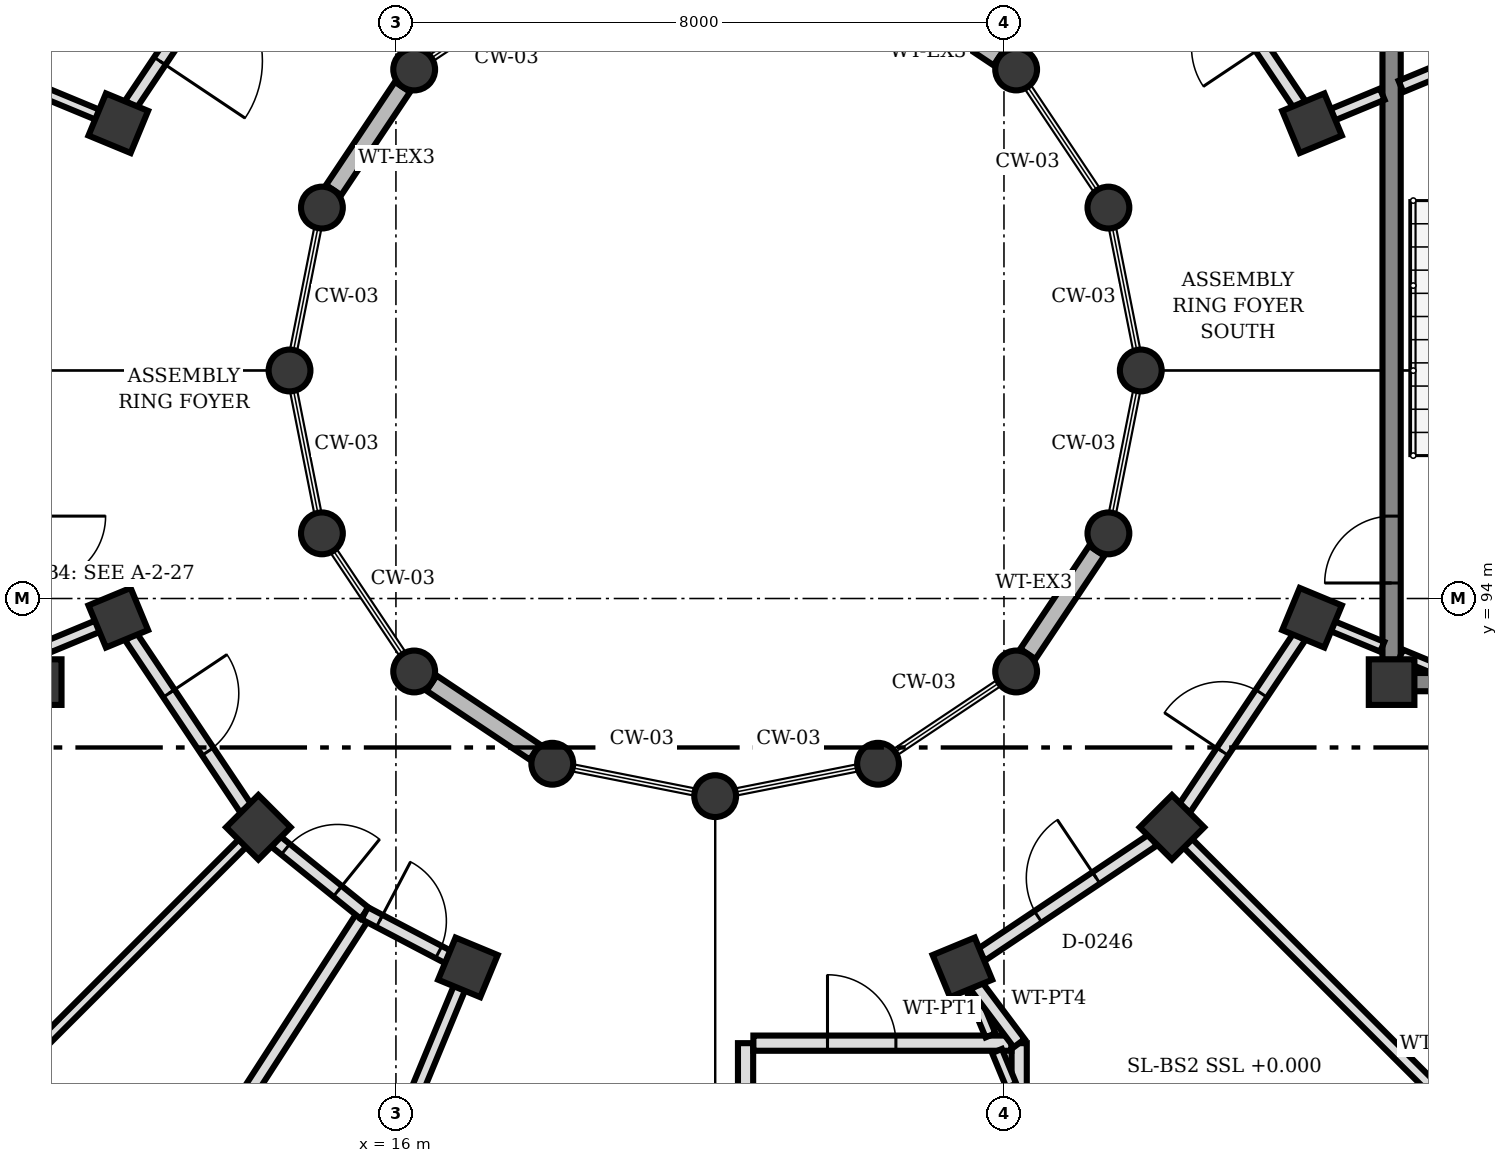
"""IFC4 building model, lengths in metres.
Left out: names, types, materials, properties, quantities, classifications, styles, units other than length and angle.
Written with IfcOpenShell. Run it as: python <this file> out.ifc"""

import sys

from ifc_helpers import new_model, si_unit, direction, frame, frame_2d, origin, origin_2d, place, context, subcontext, project, spatial, rectangle, circle, extrude, element, fill, save


model = new_model("IFC4")
c1 = context("Model", 3, precision=1e-05, world=origin(), true_north=direction((0.0, 1.0)))
c2 = subcontext(c1, "Body", "Model", "MODEL_VIEW")
j1 = project(units=[si_unit("LENGTHUNIT", "METRE"), si_unit("PLANEANGLEUNIT", "RADIAN")], contexts=[c1])
p1 = place(None, origin())
s1 = spatial("IfcSite", under=j1, at=p1, CompositionType="ELEMENT")
p2 = place(p1, origin())
s2 = spatial("IfcBuilding", under=s1, at=p2, CompositionType="ELEMENT")
p3 = place(p2, origin())
s3 = spatial("IfcBuildingStorey", under=s2, at=p3, CompositionType="ELEMENT", Elevation=0.0)
for number, where, z_axis, x_axis in (
    (1, (11.3, 92.9, 0.0), (0.0, 0.0, 1.0), (1.0, 0.0, 0.0)),
    (2, (29.1, 92.9, 0.0), (0.0, 0.0, 1.0), (1.0, 0.0, 0.0)),
):
    element("IfcColumn", number, at=place(p3, frame(where, z_axis=z_axis, x_axis=x_axis)), inside=s3, PredefinedType="COLUMN", context=c2, shape_type="SweptSolid", body=[
        extrude(rectangle(XDim=0.6, YDim=0.6, at=origin_2d()), origin(), (0.0, 0.0, 1.0), 4.5),
    ])
for number, where, z_axis, x_axis in (
    (3, (25.8, 97.0, 0.0), (0.0, 0.0, 1.0), (1.0, 0.0, 0.0)),
    (4, (25.374, 99.143, 0.0), (0.0, 0.0, 1.0), (1.0, 0.0, 0.0)),
    (5, (24.16, 100.96, 0.0), (0.0, 0.0, 1.0), (1.0, 0.0, 0.0)),
    (6, (16.24, 100.96, 0.0), (0.0, 0.0, 1.0), (1.0, 0.0, 0.0)),
    (7, (15.026, 99.143, 0.0), (0.0, 0.0, 1.0), (1.0, 0.0, 0.0)),
    (8, (14.6, 97.0, 0.0), (0.0, 0.0, 1.0), (1.0, 0.0, 0.0)),
    (9, (15.026, 94.857, 0.0), (0.0, 0.0, 1.0), (1.0, 0.0, 0.0)),
    (10, (16.24, 93.04, 0.0), (0.0, 0.0, 1.0), (1.0, 0.0, 0.0)),
    (11, (18.057, 91.826, 0.0), (0.0, 0.0, 1.0), (1.0, 0.0, 0.0)),
    (12, (20.2, 91.4, 0.0), (0.0, 0.0, 1.0), (1.0, 0.0, 0.0)),
    (13, (22.343, 91.826, 0.0), (0.0, 0.0, 1.0), (1.0, 0.0, 0.0)),
    (14, (24.16, 93.04, 0.0), (0.0, 0.0, 1.0), (1.0, 0.0, 0.0)),
    (15, (25.374, 94.857, 0.0), (0.0, 0.0, 1.0), (1.0, 0.0, 0.0)),
):
    element("IfcColumn", number, at=place(p3, frame(where, z_axis=z_axis, x_axis=x_axis)), inside=s3, PredefinedType="COLUMN", context=c2, shape_type="SweptSolid", body=[
        extrude(circle(Radius=0.275, at=origin_2d()), origin(), (0.0, 0.0, 1.0), 4.5),
    ])
for number, where, z_axis, x_axis in (
    (16, (28.053, 100.253, 0.0), (0.0, 0.0, 1.0), (0.924, 0.383, 0.0)),
    (17, (12.347, 100.253, 0.0), (0.0, 0.0, 1.0), (-0.924, 0.383, 0.0)),
    (18, (12.347, 93.747, 0.0), (0.0, 0.0, 1.0), (-0.924, -0.383, 0.0)),
    (19, (14.19, 90.99, 0.0), (0.0, 0.0, 1.0), (-0.707, -0.707, 0.0)),
    (20, (16.947, 89.147, 0.0), (0.0, 0.0, 1.0), (-0.383, -0.924, 0.0)),
    (21, (23.453, 89.147, 0.0), (0.0, 0.0, 1.0), (0.383, -0.924, 0.0)),
    (22, (26.21, 90.99, 0.0), (0.0, 0.0, 1.0), (0.707, -0.707, 0.0)),
    (23, (28.053, 93.747, 0.0), (0.0, 0.0, 1.0), (0.924, -0.383, 0.0)),
):
    element("IfcColumn", number, at=place(p3, frame(where, z_axis=z_axis, x_axis=x_axis)), inside=s3, PredefinedType="COLUMN", context=c2, shape_type="SweptSolid", body=[
        extrude(rectangle(XDim=0.6, YDim=0.6, at=origin_2d()), origin(), (0.0, 0.0, 1.0), 4.5),
    ])
for number, where, z_axis, x_axis in (
    (24, (23.93, 101.114, 0.0), (0.0, 0.0, 1.0), (-0.832, 0.555, 0.0)),
    (25, (16.086, 100.73, 0.0), (0.0, 0.0, 1.0), (-0.555, -0.832, 0.0)),
    (26, (16.47, 92.886, 0.0), (0.0, 0.0, 1.0), (0.832, -0.555, 0.0)),
    (27, (24.314, 93.27, 0.0), (0.0, 0.0, 1.0), (0.555, 0.832, 0.0)),
):
    element("IfcWall", number, at=place(p3, frame(where, z_axis=z_axis, x_axis=x_axis)), inside=s3, PredefinedType="SOLIDWALL", context=c2, shape_type="SweptSolid", body=[
        extrude(rectangle(XDim=1.632, YDim=0.24, at=frame_2d((0.816, 0.0))), origin(), (0.0, 0.0, 1.0), 3.55),
    ])
p4 = place(p3, frame((29.1, 93.192, 0.0), z_axis=(0.0, 0.0, 1.0), x_axis=(0.0, 1.0, 0.0)))
e28 = element("IfcWall", 28, at=p4, inside=s3, PredefinedType="SHEAR", context=c2, shape_type="SweptSolid", body=[
    extrude(rectangle(XDim=8.136, YDim=0.24, at=frame_2d((4.068, 0.0))), origin(), (0.0, 0.0, 1.0), 4.24),
])
p5 = place(p4, frame((1.012, 0.0, 0.0)))
e29 = element("IfcOpeningElement", 29, at=p5, cuts=e28, PredefinedType="OPENING", context=c2, shape_type="SweptSolid", body=[
    extrude(rectangle(XDim=0.88, YDim=2.1, at=frame_2d((0.44, 1.05))), frame((0.0, 0.13, 0.0), z_axis=(0.0, -1.0, 0.0), x_axis=(1.0, 0.0, 0.0)), (0.0, 0.0, 1.0), 0.26),
])
p6 = place(p3, frame((33.608, 92.9, 0.0), z_axis=(0.0, 0.0, 1.0), x_axis=(-1.0, 0.0, 0.0)))
e30 = element("IfcWall", 30, at=p6, inside=s3, PredefinedType="SHEAR", context=c2, shape_type="SweptSolid", body=[
    extrude(rectangle(XDim=4.216, YDim=0.24, at=frame_2d((2.108, 0.0))), origin(), (0.0, 0.0, 1.0), 4.24),
])
p7 = place(p3, frame((20.6, 84.867, 0.0), z_axis=(0.0, 0.0, 1.0), x_axis=(0.0, 1.0, 0.0)))
e31 = element("IfcWall", 31, at=p7, inside=s3, PredefinedType="PARTITIONING", context=c2, shape_type="SweptSolid", body=[
    extrude(rectangle(XDim=3.283, YDim=0.2, at=frame_2d((1.642, 0.0))), origin(), (0.0, 0.0, 1.0), 4.2),
])
p8 = place(p3, frame((24.2, 84.703, 0.0), z_axis=(0.0, 0.0, 1.0), x_axis=(0.0, 1.0, 0.0)))
e32 = element("IfcWall", 32, at=p8, inside=s3, PredefinedType="PARTITIONING", context=c2, shape_type="SweptSolid", body=[
    extrude(rectangle(XDim=3.447, YDim=0.2, at=frame_2d((1.724, 0.0))), origin(), (0.0, 0.0, 1.0), 3.552),
])
p9 = place(p3, frame((20.703, 88.15, 0.0), z_axis=(0.0, 0.0, 1.0), x_axis=(1.0, 0.0, 0.0)))
e33 = element("IfcWall", 33, at=p9, inside=s3, PredefinedType="PARTITIONING", context=c2, shape_type="SweptSolid", body=[
    extrude(rectangle(XDim=3.394, YDim=0.2, at=frame_2d((1.697, 0.0))), origin(), (0.0, 0.0, 1.0), 3.552),
])
p10 = place(p9, frame((0.975, 0.0, 0.0)))
e34 = element("IfcOpeningElement", 34, at=p10, cuts=e33, PredefinedType="OPENING", context=c2, shape_type="SweptSolid", body=[
    extrude(rectangle(XDim=0.9, YDim=2.2, at=frame_2d((0.45, 1.1))), frame((0.0, 0.11, 0.0), z_axis=(0.0, -1.0, 0.0), x_axis=(1.0, 0.0, 0.0)), (0.0, 0.0, 1.0), 0.22),
])
p11 = place(p3, frame((28.323, 100.364, 0.0), z_axis=(0.0, 0.0, 1.0), x_axis=(0.923840285319, 0.382778169729, 0.0)))
e35 = element("IfcWall", 35, at=p11, inside=s3, PredefinedType="PARTITIONING", context=c2, shape_type="SweptSolid", body=[
    extrude(rectangle(XDim=0.708, YDim=0.16, at=frame_2d((0.354, 0.0))), origin(), (0.0, 0.0, 1.0), 4.2),
])
p12 = place(p3, frame((29.223, 100.737, 0.0), z_axis=(0.0, 0.0, 1.0), x_axis=(0.923817443679, 0.382833293686, 0.0)))
e36 = element("IfcWall", 36, at=p12, inside=s3, PredefinedType="PARTITIONING", context=c2, shape_type="SweptSolid", body=[
    extrude(rectangle(XDim=1.985, YDim=0.16, at=frame_2d((0.993, 0.0))), origin(), (0.0, 0.0, 1.0), 4.2),
])
p13 = place(p3, frame((12.077, 100.364, 0.0), z_axis=(0.0, 0.0, 1.0), x_axis=(-0.923789734747, 0.382900151445, 0.0)))
e37 = element("IfcWall", 37, at=p13, inside=s3, PredefinedType="PARTITIONING", context=c2, shape_type="SweptSolid", body=[
    extrude(rectangle(XDim=0.708, YDim=0.14, at=frame_2d((0.354, 0.0))), origin(), (0.0, 0.0, 1.0), 4.2),
])
p14 = place(p3, frame((12.077, 93.636, 0.0), z_axis=(0.0, 0.0, 1.0), x_axis=(-0.923789734747, -0.382900151445, 0.0)))
e38 = element("IfcWall", 38, at=p14, inside=s3, PredefinedType="PARTITIONING", context=c2, shape_type="SweptSolid", body=[
    extrude(rectangle(XDim=0.708, YDim=0.16, at=frame_2d((0.354, 0.0))), origin(), (0.0, 0.0, 1.0), 3.552),
])
p15 = place(p3, frame((13.984, 90.784, 0.0), z_axis=(0.0, 0.0, 1.0), x_axis=(-0.707106781187, -0.707106781187, 0.0)))
e39 = element("IfcWall", 39, at=p15, inside=s3, PredefinedType="PARTITIONING", context=c2, shape_type="SweptSolid", body=[
    extrude(rectangle(XDim=8.392, YDim=0.14, at=frame_2d((4.196, 0.0))), origin(), (0.0, 0.0, 1.0), 3.552),
])
p16 = place(p3, frame((16.836, 88.877, 0.0), z_axis=(0.0, 0.0, 1.0), x_axis=(-0.382780060664, -0.923839501839, 0.0)))
e40 = element("IfcWall", 40, at=p16, inside=s3, PredefinedType="PARTITIONING", context=c2, shape_type="SweptSolid", body=[
    extrude(rectangle(XDim=8.391, YDim=0.16, at=frame_2d((4.196, 0.0))), origin(), (0.0, 0.0, 1.0), 3.552),
])
p17 = place(p3, frame((23.564, 88.877, 0.0), z_axis=(0.0, 0.0, 1.0), x_axis=(0.383383487336, -0.923589249417, 0.0)))
e41 = element("IfcWall", 41, at=p17, inside=s3, PredefinedType="PARTITIONING", context=c2, shape_type="SweptSolid", body=[
    extrude(rectangle(XDim=0.676, YDim=0.14, at=frame_2d((0.338, 0.0))), origin(), (0.0, 0.0, 1.0), 3.552),
])
p18 = place(p3, frame((23.908, 88.047, 0.0), z_axis=(0.0, 0.0, 1.0), x_axis=(0.3827885685, -0.92383597669, 0.0)))
e42 = element("IfcWall", 42, at=p18, inside=s3, PredefinedType="PARTITIONING", context=c2, shape_type="SweptSolid", body=[
    extrude(rectangle(XDim=0.494, YDim=0.14, at=frame_2d((0.247, 0.0))), origin(), (0.0, 0.0, 1.0), 3.552),
])
p19 = place(p3, frame((26.416, 90.784, 0.0), z_axis=(0.0, 0.0, 1.0), x_axis=(0.707121327267, -0.707092234807, 0.0)))
e43 = element("IfcWall", 43, at=p19, inside=s3, PredefinedType="PARTITIONING", context=c2, shape_type="SweptSolid", body=[
    extrude(rectangle(XDim=8.392, YDim=0.16, at=frame_2d((4.196, 0.0))), origin(), (0.0, 0.0, 1.0), 3.552),
])
p20 = place(p3, frame((28.323, 93.636, 0.0), z_axis=(0.0, 0.0, 1.0), x_axis=(0.923840285319, -0.382778169729, 0.0)))
e44 = element("IfcWall", 44, at=p20, inside=s3, PredefinedType="PARTITIONING", context=c2, shape_type="SweptSolid", body=[
    extrude(rectangle(XDim=0.708, YDim=0.14, at=frame_2d((0.354, 0.0))), origin(), (0.0, 0.0, 1.0), 3.552),
])
p21 = place(p3, frame((29.223, 93.263, 0.0), z_axis=(0.0, 0.0, 1.0), x_axis=(0.923812676193, -0.382844797933, 0.0)))
e45 = element("IfcWall", 45, at=p21, inside=s3, PredefinedType="PARTITIONING", context=c2, shape_type="SweptSolid", body=[
    extrude(rectangle(XDim=0.627, YDim=0.14, at=frame_2d((0.313, 0.0))), origin(), (0.0, 0.0, 1.0), 3.552),
])
p22 = place(p3, frame((15.589, 89.859, 0.0), z_axis=(0.0, 0.0, 1.0), x_axis=(-0.542440235144, -0.840094394278, 0.0)))
e46 = element("IfcWall", 46, at=p22, inside=s3, PredefinedType="PARTITIONING", context=c2, shape_type="SweptSolid", body=[
    extrude(rectangle(XDim=8.552, YDim=0.18, at=frame_2d((4.276, 0.0))), origin(), (0.0, 0.0, 1.0), 3.552),
])
p23 = place(p3, frame((27.888, 100.501, 0.0), z_axis=(0.0, 0.0, 1.0), x_axis=(-0.556128339679, 0.831096426298, 0.0)))
e47 = element("IfcWall", 47, at=p23, inside=s3, PredefinedType="PARTITIONING", context=c2, shape_type="SweptSolid", body=[
    extrude(rectangle(XDim=2.72, YDim=0.18, at=frame_2d((1.36, 0.0))), origin(), (0.0, 0.0, 1.0), 3.552),
])
p24 = place(p23, frame((0.9, 0.0, 0.0)))
e48 = element("IfcOpeningElement", 48, at=p24, cuts=e47, PredefinedType="OPENING", context=c2, shape_type="SweptSolid", body=[
    extrude(rectangle(XDim=0.92, YDim=2.1, at=frame_2d((0.46, 1.05))), frame((0.0, 0.1, 0.0), z_axis=(0.0, -1.0, 0.0), x_axis=(1.0, 0.0, 0.0)), (0.0, 0.0, 1.0), 0.2),
])
p25 = place(p3, frame((14.025, 102.762, 0.0), z_axis=(0.0, 0.0, 1.0), x_axis=(-0.556128339679, -0.831096426298, 0.0)))
e49 = element("IfcWall", 49, at=p25, inside=s3, PredefinedType="PARTITIONING", context=c2, shape_type="SweptSolid", body=[
    extrude(rectangle(XDim=2.72, YDim=0.18, at=frame_2d((1.36, 0.0))), origin(), (0.0, 0.0, 1.0), 3.552),
])
p26 = place(p25, frame((0.685, 0.0, 0.0)))
e50 = element("IfcOpeningElement", 50, at=p26, cuts=e49, PredefinedType="OPENING", context=c2, shape_type="SweptSolid", body=[
    extrude(rectangle(XDim=1.35, YDim=2.2, at=frame_2d((0.675, 1.1))), frame((0.0, 0.1, 0.0), z_axis=(0.0, -1.0, 0.0), x_axis=(1.0, 0.0, 0.0)), (0.0, 0.0, 1.0), 0.2),
])
p27 = place(p3, frame((12.512, 93.499, 0.0), z_axis=(0.0, 0.0, 1.0), x_axis=(0.556128339679, -0.831096426298, 0.0)))
e51 = element("IfcWall", 51, at=p27, inside=s3, PredefinedType="PARTITIONING", context=c2, shape_type="SweptSolid", body=[
    extrude(rectangle(XDim=2.72, YDim=0.18, at=frame_2d((1.36, 0.0))), origin(), (0.0, 0.0, 1.0), 3.552),
])
p28 = place(p27, frame((0.9, 0.0, 0.0)))
e52 = element("IfcOpeningElement", 52, at=p28, cuts=e51, PredefinedType="OPENING", context=c2, shape_type="SweptSolid", body=[
    extrude(rectangle(XDim=0.92, YDim=2.1, at=frame_2d((0.46, 1.05))), frame((0.0, 0.1, 0.0), z_axis=(0.0, -1.0, 0.0), x_axis=(1.0, 0.0, 0.0)), (0.0, 0.0, 1.0), 0.2),
])
p29 = place(p3, frame((14.418, 90.805, 0.0), z_axis=(0.0, 0.0, 1.0), x_axis=(0.777901544977, -0.628386176107, 0.0)))
e53 = element("IfcWall", 53, at=p29, inside=s3, PredefinedType="PARTITIONING", context=c2, shape_type="SweptSolid", body=[
    extrude(rectangle(XDim=1.506, YDim=0.18, at=frame_2d((0.753, 0.0))), origin(), (0.0, 0.0, 1.0), 3.552),
])
p30 = place(p29, frame((0.166, 0.0, 0.0)))
e54 = element("IfcOpeningElement", 54, at=p30, cuts=e53, PredefinedType="OPENING", context=c2, shape_type="SweptSolid", body=[
    extrude(rectangle(XDim=0.88, YDim=2.1, at=frame_2d((0.44, 1.05))), frame((0.0, 0.1, 0.0), z_axis=(0.0, -1.0, 0.0), x_axis=(1.0, 0.0, 0.0)), (0.0, 0.0, 1.0), 0.2),
])
p31 = place(p3, frame((15.589, 89.859, 0.0), z_axis=(0.0, 0.0, 1.0), x_axis=(0.885553865366, -0.464536706337, 0.0)))
e55 = element("IfcWall", 55, at=p31, inside=s3, PredefinedType="PARTITIONING", context=c2, shape_type="SweptSolid", body=[
    extrude(rectangle(XDim=1.24, YDim=0.18, at=frame_2d((0.62, 0.0))), origin(), (0.0, 0.0, 1.0), 3.552),
])
p32 = place(p31, frame((0.22, 0.0, 0.0)))
e56 = element("IfcOpeningElement", 56, at=p32, cuts=e55, PredefinedType="OPENING", context=c2, shape_type="SweptSolid", body=[
    extrude(rectangle(XDim=0.88, YDim=2.1, at=frame_2d((0.44, 1.05))), frame((0.0, 0.1, 0.0), z_axis=(0.0, -1.0, 0.0), x_axis=(1.0, 0.0, 0.0)), (0.0, 0.0, 1.0), 0.2),
])
p33 = place(p3, frame((23.701, 89.312, 0.0), z_axis=(0.0, 0.0, 1.0), x_axis=(0.831096426298, 0.556128339679, 0.0)))
e57 = element("IfcWall", 57, at=p33, inside=s3, PredefinedType="PARTITIONING", context=c2, shape_type="SweptSolid", body=[
    extrude(rectangle(XDim=2.72, YDim=0.18, at=frame_2d((1.36, 0.0))), origin(), (0.0, 0.0, 1.0), 3.552),
])
p34 = place(p33, frame((0.9, 0.0, 0.0)))
e58 = element("IfcOpeningElement", 58, at=p34, cuts=e57, PredefinedType="OPENING", context=c2, shape_type="SweptSolid", body=[
    extrude(rectangle(XDim=0.92, YDim=2.1, at=frame_2d((0.46, 1.05))), frame((0.0, 0.1, 0.0), z_axis=(0.0, -1.0, 0.0), x_axis=(1.0, 0.0, 0.0)), (0.0, 0.0, 1.0), 0.2),
])
p35 = place(p3, frame((26.375, 91.238, 0.0), z_axis=(0.0, 0.0, 1.0), x_axis=(0.556128339679, 0.831096426298, 0.0)))
e59 = element("IfcWall", 59, at=p35, inside=s3, PredefinedType="PARTITIONING", context=c2, shape_type="SweptSolid", body=[
    extrude(rectangle(XDim=2.72, YDim=0.18, at=frame_2d((1.36, 0.0))), origin(), (0.0, 0.0, 1.0), 3.552),
])
p36 = place(p35, frame((0.9, 0.0, 0.0)))
e60 = element("IfcOpeningElement", 60, at=p36, cuts=e59, PredefinedType="OPENING", context=c2, shape_type="SweptSolid", body=[
    extrude(rectangle(XDim=0.92, YDim=2.1, at=frame_2d((0.46, 1.05))), frame((0.0, 0.1, 0.0), z_axis=(0.0, -1.0, 0.0), x_axis=(1.0, 0.0, 0.0)), (0.0, 0.0, 1.0), 0.2),
])
p37 = place(p3, frame((24.2, 88.15, 0.0), z_axis=(0.0, 0.0, 1.0), x_axis=(-0.599213856278, 0.800589004699, 0.0)))
e61 = element("IfcWall", 61, at=p37, inside=s3, PredefinedType="PARTITIONING", context=c2, shape_type="SweptSolid", body=[
    extrude(rectangle(XDim=0.944, YDim=0.18, at=frame_2d((0.472, 0.0))), origin(), (0.0, 0.0, 1.0), 3.552),
])
p38 = place(p5, origin())
e62 = element("IfcDoor", 62, at=p38, inside=s3, OperationType="SINGLE_SWING_LEFT", PredefinedType="DOOR", context=c2, shape_type="SweptSolid", body=[
    extrude(rectangle(XDim=0.88, YDim=2.1, at=frame_2d((0.44, 1.05))), frame((0.0, 0.025, 0.0), z_axis=(0.0, -1.0, 0.0), x_axis=(1.0, 0.0, 0.0)), (0.0, 0.0, 1.0), 0.05),
])
fill(e29, e62)
p39 = place(p10, origin())
e63 = element("IfcDoor", 63, at=p39, inside=s3, OperationType="SINGLE_SWING_LEFT", PredefinedType="DOOR", context=c2, shape_type="SweptSolid", body=[
    extrude(rectangle(XDim=0.9, YDim=2.2, at=frame_2d((0.45, 1.1))), frame((0.0, 0.025, 0.0), z_axis=(0.0, -1.0, 0.0), x_axis=(1.0, 0.0, 0.0)), (0.0, 0.0, 1.0), 0.05),
])
fill(e34, e63)
p40 = place(p26, origin())
e64 = element("IfcDoor", 64, at=p40, inside=s3, OperationType="SINGLE_SWING_RIGHT", PredefinedType="DOOR", context=c2, shape_type="SweptSolid", body=[
    extrude(rectangle(XDim=1.35, YDim=2.2, at=frame_2d((0.675, 1.1))), frame((0.0, 0.025, 0.0), z_axis=(0.0, -1.0, 0.0), x_axis=(1.0, 0.0, 0.0)), (0.0, 0.0, 1.0), 0.05),
])
fill(e50, e64)
p41 = place(p28, origin())
e65 = element("IfcDoor", 65, at=p41, inside=s3, OperationType="SINGLE_SWING_LEFT", PredefinedType="DOOR", context=c2, shape_type="SweptSolid", body=[
    extrude(rectangle(XDim=0.92, YDim=2.1, at=frame_2d((0.46, 1.05))), frame((0.0, 0.025, 0.0), z_axis=(0.0, -1.0, 0.0), x_axis=(1.0, 0.0, 0.0)), (0.0, 0.0, 1.0), 0.05),
])
fill(e52, e65)
p42 = place(p30, origin())
e66 = element("IfcDoor", 66, at=p42, inside=s3, OperationType="SINGLE_SWING_RIGHT", PredefinedType="DOOR", context=c2, shape_type="SweptSolid", body=[
    extrude(rectangle(XDim=0.88, YDim=2.1, at=frame_2d((0.44, 1.05))), frame((0.0, 0.025, 0.0), z_axis=(0.0, -1.0, 0.0), x_axis=(1.0, 0.0, 0.0)), (0.0, 0.0, 1.0), 0.05),
])
fill(e54, e66)
p43 = place(p32, origin())
e67 = element("IfcDoor", 67, at=p43, inside=s3, OperationType="SINGLE_SWING_LEFT", PredefinedType="DOOR", context=c2, shape_type="SweptSolid", body=[
    extrude(rectangle(XDim=0.88, YDim=2.1, at=frame_2d((0.44, 1.05))), frame((0.0, 0.025, 0.0), z_axis=(0.0, -1.0, 0.0), x_axis=(1.0, 0.0, 0.0)), (0.0, 0.0, 1.0), 0.05),
])
fill(e56, e67)
p44 = place(p34, origin())
e68 = element("IfcDoor", 68, at=p44, inside=s3, OperationType="SINGLE_SWING_RIGHT", PredefinedType="DOOR", context=c2, shape_type="SweptSolid", body=[
    extrude(rectangle(XDim=0.92, YDim=2.1, at=frame_2d((0.46, 1.05))), frame((0.0, 0.025, 0.0), z_axis=(0.0, -1.0, 0.0), x_axis=(1.0, 0.0, 0.0)), (0.0, 0.0, 1.0), 0.05),
])
fill(e58, e68)
p45 = place(p36, origin())
e69 = element("IfcDoor", 69, at=p45, inside=s3, OperationType="SINGLE_SWING_LEFT", PredefinedType="DOOR", context=c2, shape_type="SweptSolid", body=[
    extrude(rectangle(XDim=0.92, YDim=2.1, at=frame_2d((0.46, 1.05))), frame((0.0, 0.025, 0.0), z_axis=(0.0, -1.0, 0.0), x_axis=(1.0, 0.0, 0.0)), (0.0, 0.0, 1.0), 0.05),
])
fill(e60, e69)
save(model, sys.argv[1])
